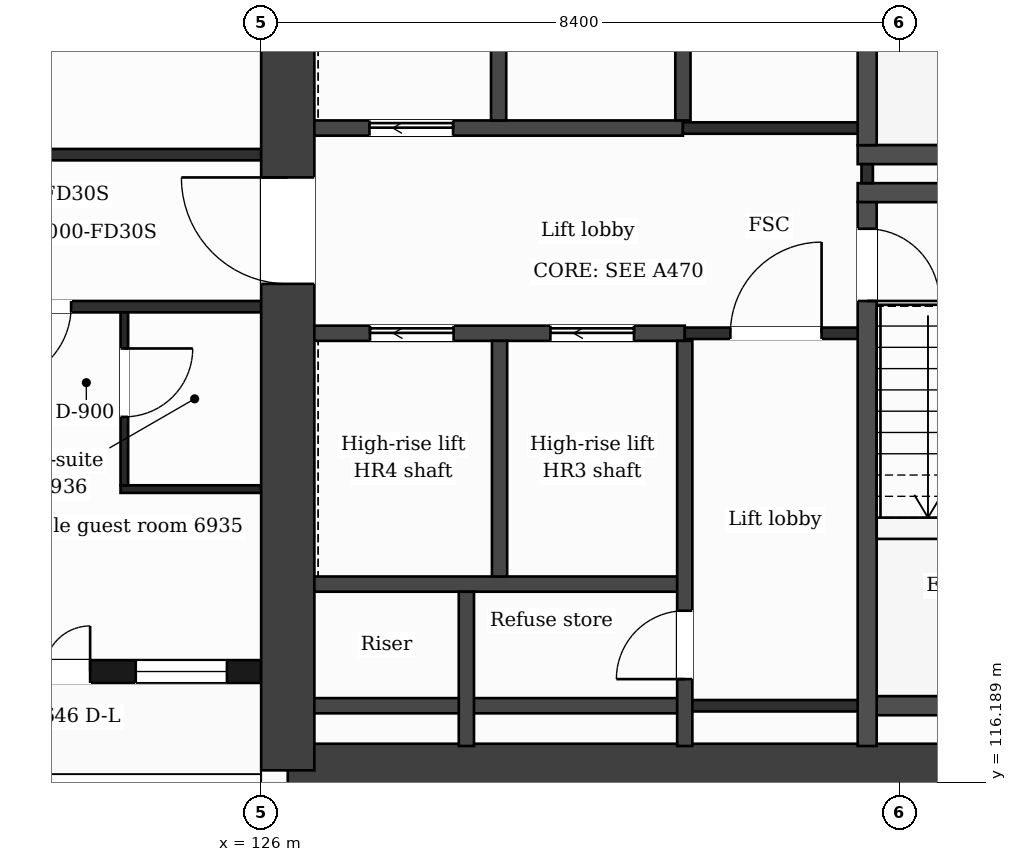
"""IFC4 building model, lengths in metres.
Left out: names, types, materials, properties, quantities, classifications, styles, units other than length and angle.
Written with IfcOpenShell. Run it as: python <this file> out.ifc"""

import sys

from ifc_helpers import new_model, si_unit, direction, frame, frame_2d, origin, place, context, subcontext, project, spatial, rectangle, extrude, element, fill, save


model = new_model("IFC4")
c1 = context("Model", 3, precision=1e-05, world=origin(), true_north=direction((0.0, 1.0)))
c2 = subcontext(c1, "Body", "Model", "MODEL_VIEW")
j1 = project(units=[si_unit("LENGTHUNIT", "METRE"), si_unit("PLANEANGLEUNIT", "RADIAN")], contexts=[c1])
p1 = place(None, origin())
s1 = spatial("IfcSite", under=j1, at=p1, CompositionType="ELEMENT")
p2 = place(p1, origin())
s2 = spatial("IfcBuilding", under=s1, at=p2, CompositionType="ELEMENT")
p3 = place(p2, frame((0.0, 0.0, 284.9)))
s3 = spatial("IfcBuildingStorey", under=s2, at=p3, CompositionType="ELEMENT", Elevation=284.9)
p4 = place(p3, frame((139.977, 116.35, 0.0), z_axis=(0.0, 0.0, 1.0), x_axis=(-1.0, 0.0, 0.0)))
e1 = element("IfcWall", 1, at=p4, inside=s3, PredefinedType="SHEAR", context=c2, shape_type="SweptSolid", body=[
    extrude(rectangle(XDim=13.626, YDim=0.7, at=frame_2d((6.813, 0.0))), origin(), (0.0, 0.0, 1.0), 3.7),
])
p5 = place(p3, frame((126.35, 116.35, 0.0), z_axis=(0.0, 0.0, 1.0), x_axis=(0.0, 1.0, 0.0)))
e2 = element("IfcWall", 2, at=p5, inside=s3, PredefinedType="SHEAR", context=c2, shape_type="SweptSolid", body=[
    extrude(rectangle(XDim=15.7, YDim=0.7, at=frame_2d((7.85, 0.0))), origin(), (0.0, 0.0, 1.0), 3.7),
])
p6 = place(p5, frame((6.4, 0.0, 0.0)))
e3 = element("IfcOpeningElement", 3, at=p6, cuts=e2, PredefinedType="OPENING", context=c2, shape_type="SweptSolid", body=[
    extrude(rectangle(XDim=1.4, YDim=2.1, at=frame_2d((0.7, 1.05))), frame((0.0, 0.36, 0.0), z_axis=(0.0, -1.0, 0.0), x_axis=(1.0, 0.0, 0.0)), (0.0, 0.0, 1.0), 0.72),
])
p7 = place(p3, frame((100.8, 117.65, 0.0), z_axis=(0.0, 0.0, 1.0), x_axis=(1.0, 0.0, 0.0)))
e4 = element("IfcWall", 4, at=p7, inside=s3, PredefinedType="SOLIDWALL", context=c2, shape_type="SweptSolid", body=[
    extrude(rectangle(XDim=25.2, YDim=0.3, at=frame_2d((12.6, 0.0))), origin(), (0.0, 0.0, 1.0), 3.38),
])
p8 = place(p7, frame((0.95, 0.0, 0.9)))
e5 = element("IfcOpeningElement", 5, at=p8, cuts=e4, PredefinedType="OPENING", context=c2, shape_type="SweptSolid", body=[
    extrude(rectangle(XDim=2.4, YDim=2.1, at=frame_2d((1.2, 1.05))), frame((0.0, 0.16, 0.0), z_axis=(0.0, -1.0, 0.0), x_axis=(1.0, 0.0, 0.0)), (0.0, 0.0, 1.0), 0.32),
])
p9 = place(p7, frame((5.1, 0.0, 0.9)))
e6 = element("IfcOpeningElement", 6, at=p9, cuts=e4, PredefinedType="OPENING", context=c2, shape_type="SweptSolid", body=[
    extrude(rectangle(XDim=2.4, YDim=2.1, at=frame_2d((1.2, 1.05))), frame((0.0, 0.16, 0.0), z_axis=(0.0, -1.0, 0.0), x_axis=(1.0, 0.0, 0.0)), (0.0, 0.0, 1.0), 0.32),
])
p10 = place(p7, frame((9.3, 0.0, 0.9)))
e7 = element("IfcOpeningElement", 7, at=p10, cuts=e4, PredefinedType="OPENING", context=c2, shape_type="SweptSolid", body=[
    extrude(rectangle(XDim=2.4, YDim=2.1, at=frame_2d((1.2, 1.05))), frame((0.0, 0.16, 0.0), z_axis=(0.0, -1.0, 0.0), x_axis=(1.0, 0.0, 0.0)), (0.0, 0.0, 1.0), 0.32),
])
p11 = place(p7, frame((14.1, 0.0, 0.9)))
e8 = element("IfcOpeningElement", 8, at=p11, cuts=e4, PredefinedType="OPENING", context=c2, shape_type="SweptSolid", body=[
    extrude(rectangle(XDim=1.2, YDim=2.1, at=frame_2d((0.6, 1.05))), frame((0.0, 0.16, 0.0), z_axis=(0.0, -1.0, 0.0), x_axis=(1.0, 0.0, 0.0)), (0.0, 0.0, 1.0), 0.32),
])
p12 = place(p7, frame((18.3, 0.0, 0.9)))
e9 = element("IfcOpeningElement", 9, at=p12, cuts=e4, PredefinedType="OPENING", context=c2, shape_type="SweptSolid", body=[
    extrude(rectangle(XDim=1.2, YDim=2.1, at=frame_2d((0.6, 1.05))), frame((0.0, 0.16, 0.0), z_axis=(0.0, -1.0, 0.0), x_axis=(1.0, 0.0, 0.0)), (0.0, 0.0, 1.0), 0.32),
])
p13 = place(p7, frame((21.75, 0.0, 0.0)))
e10 = element("IfcOpeningElement", 10, at=p13, cuts=e4, PredefinedType="OPENING", context=c2, shape_type="SweptSolid", body=[
    extrude(rectangle(XDim=1.2, YDim=2.4, at=frame_2d((0.6, 1.2))), frame((0.0, 0.16, 0.0), z_axis=(0.0, -1.0, 0.0), x_axis=(1.0, 0.0, 0.0)), (0.0, 0.0, 1.0), 0.32),
])
p14 = place(p7, frame((23.55, 0.0, 0.9)))
e11 = element("IfcOpeningElement", 11, at=p14, cuts=e4, PredefinedType="OPENING", context=c2, shape_type="SweptSolid", body=[
    extrude(rectangle(XDim=1.2, YDim=2.1, at=frame_2d((0.6, 1.05))), frame((0.0, 0.16, 0.0), z_axis=(0.0, -1.0, 0.0), x_axis=(1.0, 0.0, 0.0)), (0.0, 0.0, 1.0), 0.32),
])
p15 = place(p3, frame((126.7, 117.2, 0.0), z_axis=(0.0, 0.0, 1.0), x_axis=(1.0, 0.0, 0.0)))
e12 = element("IfcWall", 12, at=p15, inside=s3, PredefinedType="PARTITIONING", context=c2, shape_type="SweptSolid", body=[
    extrude(rectangle(XDim=4.873, YDim=0.2, at=frame_2d((2.437, 0.0))), origin(), (0.0, 0.0, 1.0), 3.38),
])
p16 = place(p3, frame((131.573, 117.2, 0.0), z_axis=(0.0, 0.0, 1.0), x_axis=(1.0, 0.0, 0.0)))
e13 = element("IfcWall", 13, at=p16, inside=s3, PredefinedType="PARTITIONING", context=c2, shape_type="SweptSolid", body=[
    extrude(rectangle(XDim=2.4, YDim=0.15, at=frame_2d((1.2, 0.0))), origin(), (0.0, 0.0, 1.0), 3.38),
])
p17 = place(p3, frame((133.973, 117.2, 0.0), z_axis=(0.0, 0.0, 1.0), x_axis=(1.0, 0.0, 0.0)))
e14 = element("IfcWall", 14, at=p17, inside=s3, PredefinedType="PARTITIONING", context=c2, shape_type="SweptSolid", body=[
    extrude(rectangle(XDim=3.275, YDim=0.25, at=frame_2d((1.638, 0.0))), origin(), (0.0, 0.0, 1.0), 3.38),
])
p18 = place(p3, frame((126.7, 118.8, 0.0), z_axis=(0.0, 0.0, 1.0), x_axis=(1.0, 0.0, 0.0)))
e15 = element("IfcWall", 15, at=p18, inside=s3, PredefinedType="PARTITIONING", context=c2, shape_type="SweptSolid", body=[
    extrude(rectangle(XDim=4.873, YDim=0.2, at=frame_2d((2.437, 0.0))), origin(), (0.0, 0.0, 1.0), 3.38),
])
p19 = place(p3, frame((124.15, 120.05, 0.0), z_axis=(0.0, 0.0, 1.0), x_axis=(1.0, 0.0, 0.0)))
e16 = element("IfcWall", 16, at=p19, inside=s3, PredefinedType="PARTITIONING", context=c2, shape_type="SweptSolid", body=[
    extrude(rectangle(XDim=1.85, YDim=0.1, at=frame_2d((0.925, 0.0))), origin(), (0.0, 0.0, 1.0), 3.38),
])
p20 = place(p3, frame((126.7, 122.1, 0.0), z_axis=(0.0, 0.0, 1.0), x_axis=(1.0, 0.0, 0.0)))
e17 = element("IfcWall", 17, at=p20, inside=s3, PredefinedType="PARTITIONING", context=c2, shape_type="SweptSolid", body=[
    extrude(rectangle(XDim=4.873, YDim=0.2, at=frame_2d((2.437, 0.0))), origin(), (0.0, 0.0, 1.0), 3.38),
])
p21 = place(p20, frame((3.105, 0.0, 0.0)))
e18 = element("IfcOpeningElement", 18, at=p21, cuts=e17, PredefinedType="OPENING", context=c2, shape_type="SweptSolid", body=[
    extrude(rectangle(XDim=1.1, YDim=2.1, at=frame_2d((0.55, 1.05))), frame((0.0, 0.11, 0.0), z_axis=(0.0, -1.0, 0.0), x_axis=(1.0, 0.0, 0.0)), (0.0, 0.0, 1.0), 0.22),
])
p22 = place(p20, frame((0.732, 0.0, 0.0)))
e19 = element("IfcOpeningElement", 19, at=p22, cuts=e17, PredefinedType="OPENING", context=c2, shape_type="SweptSolid", body=[
    extrude(rectangle(XDim=1.1, YDim=2.1, at=frame_2d((0.55, 1.05))), frame((0.0, 0.11, 0.0), z_axis=(0.0, -1.0, 0.0), x_axis=(1.0, 0.0, 0.0)), (0.0, 0.0, 1.0), 0.22),
])
p23 = place(p3, frame((131.573, 122.1, 0.0), z_axis=(0.0, 0.0, 1.0), x_axis=(1.0, 0.0, 0.0)))
e20 = element("IfcWall", 20, at=p23, inside=s3, PredefinedType="PARTITIONING", context=c2, shape_type="SweptSolid", body=[
    extrude(rectangle(XDim=2.4, YDim=0.15, at=frame_2d((1.2, 0.0))), origin(), (0.0, 0.0, 1.0), 3.38),
])
p24 = place(p23, frame((0.6, 0.0, 0.0)))
e21 = element("IfcOpeningElement", 21, at=p24, cuts=e20, PredefinedType="OPENING", context=c2, shape_type="SweptSolid", body=[
    extrude(rectangle(XDim=1.2, YDim=2.1, at=frame_2d((0.6, 1.05))), frame((0.0, 0.085, 0.0), z_axis=(0.0, -1.0, 0.0), x_axis=(1.0, 0.0, 0.0)), (0.0, 0.0, 1.0), 0.17),
])
p25 = place(p3, frame((100.8, 122.45, 0.0), z_axis=(0.0, 0.0, 1.0), x_axis=(1.0, 0.0, 0.0)))
e22 = element("IfcWall", 22, at=p25, inside=s3, PredefinedType="PARTITIONING", context=c2, shape_type="SweptSolid", body=[
    extrude(rectangle(XDim=25.2, YDim=0.15, at=frame_2d((12.6, 0.0))), origin(), (0.0, 0.0, 1.0), 3.38),
])
p26 = place(p25, frame((0.55, 0.0, 0.0)))
e23 = element("IfcOpeningElement", 23, at=p26, cuts=e22, PredefinedType="OPENING", context=c2, shape_type="SweptSolid", body=[
    extrude(rectangle(XDim=1.0, YDim=2.1, at=frame_2d((0.5, 1.05))), frame((0.0, 0.085, 0.0), z_axis=(0.0, -1.0, 0.0), x_axis=(1.0, 0.0, 0.0)), (0.0, 0.0, 1.0), 0.17),
])
p27 = place(p25, frame((9.375, 0.0, 0.0)))
e24 = element("IfcOpeningElement", 24, at=p27, cuts=e22, PredefinedType="OPENING", context=c2, shape_type="SweptSolid", body=[
    extrude(rectangle(XDim=1.0, YDim=2.1, at=frame_2d((0.5, 1.05))), frame((0.0, 0.085, 0.0), z_axis=(0.0, -1.0, 0.0), x_axis=(1.0, 0.0, 0.0)), (0.0, 0.0, 1.0), 0.17),
])
p28 = place(p25, frame((13.23, 0.0, 0.0)))
e25 = element("IfcOpeningElement", 25, at=p28, cuts=e22, PredefinedType="OPENING", context=c2, shape_type="SweptSolid", body=[
    extrude(rectangle(XDim=1.0, YDim=2.1, at=frame_2d((0.5, 1.05))), frame((0.0, 0.085, 0.0), z_axis=(0.0, -1.0, 0.0), x_axis=(1.0, 0.0, 0.0)), (0.0, 0.0, 1.0), 0.17),
])
p29 = place(p25, frame((19.513, 0.0, 0.0)))
e26 = element("IfcOpeningElement", 26, at=p29, cuts=e22, PredefinedType="OPENING", context=c2, shape_type="SweptSolid", body=[
    extrude(rectangle(XDim=0.95, YDim=2.1, at=frame_2d((0.475, 1.05))), frame((0.0, 0.085, 0.0), z_axis=(0.0, -1.0, 0.0), x_axis=(1.0, 0.0, 0.0)), (0.0, 0.0, 1.0), 0.17),
])
p30 = place(p25, frame((21.7, 0.0, 0.0)))
e27 = element("IfcOpeningElement", 27, at=p30, cuts=e22, PredefinedType="OPENING", context=c2, shape_type="SweptSolid", body=[
    extrude(rectangle(XDim=1.0, YDim=2.1, at=frame_2d((0.5, 1.05))), frame((0.0, 0.085, 0.0), z_axis=(0.0, -1.0, 0.0), x_axis=(1.0, 0.0, 0.0)), (0.0, 0.0, 1.0), 0.17),
])
for number, where, z_axis, x_axis in (
    (28, (133.848, 123.95, 0.0), (0.0, 0.0, 1.0), (1.0, 0.0, 0.0)),
    (29, (133.848, 124.45, 0.0), (0.0, 0.0, 1.0), (1.0, 0.0, 0.0)),
):
    element("IfcWall", number, at=place(p3, frame(where, z_axis=z_axis, x_axis=x_axis)), inside=s3, PredefinedType="PARTITIONING", context=c2, shape_type="SweptSolid", body=[
        extrude(rectangle(XDim=3.4, YDim=0.25, at=frame_2d((1.7, 0.0))), origin(), (0.0, 0.0, 1.0), 3.38),
    ])
p31 = place(p3, frame((100.8, 124.45, 0.0), z_axis=(0.0, 0.0, 1.0), x_axis=(1.0, 0.0, 0.0)))
e30 = element("IfcWall", 30, at=p31, inside=s3, PredefinedType="PARTITIONING", context=c2, shape_type="SweptSolid", body=[
    extrude(rectangle(XDim=25.2, YDim=0.15, at=frame_2d((12.6, 0.0))), origin(), (0.0, 0.0, 1.0), 3.38),
])
p32 = place(p31, frame((21.075, 0.0, 0.0)))
e31 = element("IfcOpeningElement", 31, at=p32, cuts=e30, PredefinedType="OPENING", context=c2, shape_type="SweptSolid", body=[
    extrude(rectangle(XDim=1.0, YDim=2.1, at=frame_2d((0.5, 1.05))), frame((0.0, 0.085, 0.0), z_axis=(0.0, -1.0, 0.0), x_axis=(1.0, 0.0, 0.0)), (0.0, 0.0, 1.0), 0.17),
])
p33 = place(p31, frame((5.375, 0.0, 0.0)))
e32 = element("IfcOpeningElement", 32, at=p33, cuts=e30, PredefinedType="OPENING", context=c2, shape_type="SweptSolid", body=[
    extrude(rectangle(XDim=1.0, YDim=2.1, at=frame_2d((0.5, 1.05))), frame((0.0, 0.085, 0.0), z_axis=(0.0, -1.0, 0.0), x_axis=(1.0, 0.0, 0.0)), (0.0, 0.0, 1.0), 0.17),
])
p34 = place(p31, frame((12.1, 0.0, 0.0)))
e33 = element("IfcOpeningElement", 33, at=p34, cuts=e30, PredefinedType="OPENING", context=c2, shape_type="SweptSolid", body=[
    extrude(rectangle(XDim=1.0, YDim=2.1, at=frame_2d((0.5, 1.05))), frame((0.0, 0.085, 0.0), z_axis=(0.0, -1.0, 0.0), x_axis=(1.0, 0.0, 0.0)), (0.0, 0.0, 1.0), 0.17),
])
p35 = place(p31, frame((17.93, 0.0, 0.0)))
e34 = element("IfcOpeningElement", 34, at=p35, cuts=e30, PredefinedType="OPENING", context=c2, shape_type="SweptSolid", body=[
    extrude(rectangle(XDim=1.0, YDim=2.1, at=frame_2d((0.5, 1.05))), frame((0.0, 0.085, 0.0), z_axis=(0.0, -1.0, 0.0), x_axis=(1.0, 0.0, 0.0)), (0.0, 0.0, 1.0), 0.17),
])
p36 = place(p3, frame((126.7, 124.8, 0.0), z_axis=(0.0, 0.0, 1.0), x_axis=(1.0, 0.0, 0.0)))
e35 = element("IfcWall", 35, at=p36, inside=s3, PredefinedType="PARTITIONING", context=c2, shape_type="SweptSolid", body=[
    extrude(rectangle(XDim=4.849, YDim=0.2, at=frame_2d((2.424, 0.0))), origin(), (0.0, 0.0, 1.0), 3.38),
])
p37 = place(p36, frame((0.725, 0.0, 0.0)))
e36 = element("IfcOpeningElement", 36, at=p37, cuts=e35, PredefinedType="OPENING", context=c2, shape_type="SweptSolid", body=[
    extrude(rectangle(XDim=1.1, YDim=2.1, at=frame_2d((0.55, 1.05))), frame((0.0, 0.11, 0.0), z_axis=(0.0, -1.0, 0.0), x_axis=(1.0, 0.0, 0.0)), (0.0, 0.0, 1.0), 0.22),
])
p38 = place(p3, frame((131.549, 124.8, 0.0), z_axis=(0.0, 0.0, 1.0), x_axis=(1.0, 0.0, 0.0)))
e37 = element("IfcWall", 37, at=p38, inside=s3, PredefinedType="PARTITIONING", context=c2, shape_type="SweptSolid", body=[
    extrude(rectangle(XDim=2.549, YDim=0.15, at=frame_2d((1.275, 0.0))), origin(), (0.0, 0.0, 1.0), 3.38),
])
p39 = place(p3, frame((124.2, 120.1, 0.0), z_axis=(0.0, 0.0, 1.0), x_axis=(0.0, 1.0, 0.0)))
e38 = element("IfcWall", 38, at=p39, inside=s3, PredefinedType="PARTITIONING", context=c2, shape_type="SweptSolid", body=[
    extrude(rectangle(XDim=2.275, YDim=0.1, at=frame_2d((1.137, 0.0))), origin(), (0.0, 0.0, 1.0), 3.38),
])
p40 = place(p39, frame((0.9, 0.0, 0.0)))
e39 = element("IfcOpeningElement", 39, at=p40, cuts=e38, PredefinedType="OPENING", context=c2, shape_type="SweptSolid", body=[
    extrude(rectangle(XDim=0.9, YDim=2.1, at=frame_2d((0.45, 1.05))), frame((0.0, 0.06, 0.0), z_axis=(0.0, -1.0, 0.0), x_axis=(1.0, 0.0, 0.0)), (0.0, 0.0, 1.0), 0.12),
])
p41 = place(p3, frame((128.7, 116.67, 0.0), z_axis=(0.0, 0.0, 1.0), x_axis=(0.0, 1.0, 0.0)))
e40 = element("IfcWall", 40, at=p41, inside=s3, PredefinedType="PARTITIONING", context=c2, shape_type="SweptSolid", body=[
    extrude(rectangle(XDim=2.03, YDim=0.2, at=frame_2d((1.015, 0.0))), origin(), (0.0, 0.0, 1.0), 3.38),
])
for number, where, z_axis, x_axis in (
    (41, (129.124, 124.9, 0.0), (0.0, 0.0, 1.0), (0.0, 1.0, 0.0)),
    (42, (129.136, 118.9, 0.0), (0.0, 0.0, 1.0), (0.0, 1.0, 0.0)),
    (43, (131.549, 124.9, 0.0), (0.0, 0.0, 1.0), (0.0, 1.0, 0.0)),
):
    element("IfcWall", number, at=place(p3, frame(where, z_axis=z_axis, x_axis=x_axis)), inside=s3, PredefinedType="PARTITIONING", context=c2, shape_type="SweptSolid", body=[
        extrude(rectangle(XDim=3.1, YDim=0.2, at=frame_2d((1.55, 0.0))), origin(), (0.0, 0.0, 1.0), 3.38),
    ])
p42 = place(p3, frame((131.573, 116.67, 0.0), z_axis=(0.0, 0.0, 1.0), x_axis=(0.0, 1.0, 0.0)))
e44 = element("IfcWall", 44, at=p42, inside=s3, PredefinedType="PARTITIONING", context=c2, shape_type="SweptSolid", body=[
    extrude(rectangle(XDim=5.33, YDim=0.2, at=frame_2d((2.665, 0.0))), origin(), (0.0, 0.0, 1.0), 3.38),
])
p43 = place(p42, frame((0.88, 0.0, 0.0)))
e45 = element("IfcOpeningElement", 45, at=p43, cuts=e44, PredefinedType="OPENING", context=c2, shape_type="SweptSolid", body=[
    extrude(rectangle(XDim=0.9, YDim=2.1, at=frame_2d((0.45, 1.05))), frame((0.0, 0.11, 0.0), z_axis=(0.0, -1.0, 0.0), x_axis=(1.0, 0.0, 0.0)), (0.0, 0.0, 1.0), 0.22),
])
p44 = place(p3, frame((133.973, 124.075, 0.0), z_axis=(0.0, 0.0, 1.0), x_axis=(0.0, 1.0, 0.0)))
e46 = element("IfcWall", 46, at=p44, inside=s3, PredefinedType="PARTITIONING", context=c2, shape_type="SweptSolid", body=[
    extrude(rectangle(XDim=0.25, YDim=0.15, at=frame_2d((0.125, 0.0))), origin(), (0.0, 0.0, 1.0), 3.38),
])
p45 = place(p3, frame((133.973, 116.67, 0.0), z_axis=(0.0, 0.0, 1.0), x_axis=(0.0, 1.0, 0.0)))
e47 = element("IfcWall", 47, at=p45, inside=s3, PredefinedType="PARTITIONING", context=c2, shape_type="SweptSolid", body=[
    extrude(rectangle(XDim=7.155, YDim=0.25, at=frame_2d((3.578, 0.0))), origin(), (0.0, 0.0, 1.0), 3.38),
])
p46 = place(p45, frame((5.855, 0.0, 0.0)))
e48 = element("IfcOpeningElement", 48, at=p46, cuts=e47, PredefinedType="OPENING", context=c2, shape_type="SweptSolid", body=[
    extrude(rectangle(XDim=0.95, YDim=2.1, at=frame_2d((0.475, 1.05))), frame((0.0, 0.135, 0.0), z_axis=(0.0, -1.0, 0.0), x_axis=(1.0, 0.0, 0.0)), (0.0, 0.0, 1.0), 0.27),
])
p47 = place(p3, frame((133.973, 124.575, 0.0), z_axis=(0.0, 0.0, 1.0), x_axis=(0.0, 1.0, 0.0)))
e49 = element("IfcWall", 49, at=p47, inside=s3, PredefinedType="PARTITIONING", context=c2, shape_type="SweptSolid", body=[
    extrude(rectangle(XDim=7.155, YDim=0.25, at=frame_2d((3.578, 0.0))), origin(), (0.0, 0.0, 1.0), 3.38),
])
p48 = place(p47, frame((5.325, 0.0, 0.0)))
e50 = element("IfcOpeningElement", 50, at=p48, cuts=e49, PredefinedType="OPENING", context=c2, shape_type="SweptSolid", body=[
    extrude(rectangle(XDim=1.0, YDim=2.1, at=frame_2d((0.5, 1.05))), frame((0.0, 0.135, 0.0), z_axis=(0.0, -1.0, 0.0), x_axis=(1.0, 0.0, 0.0)), (0.0, 0.0, 1.0), 0.27),
])
p49 = place(p13, origin())
e51 = element("IfcDoor", 51, at=p49, inside=s3, OperationType="DOUBLE_DOOR_SINGLE_SWING", PredefinedType="DOOR", context=c2, shape_type="SweptSolid", body=[
    extrude(rectangle(XDim=1.2, YDim=2.4, at=frame_2d((0.6, 1.2))), frame((0.0, 0.025, 0.0), z_axis=(0.0, -1.0, 0.0), x_axis=(1.0, 0.0, 0.0)), (0.0, 0.0, 1.0), 0.05),
])
fill(e10, e51)
p50 = place(p14, origin())
e52 = element("IfcWindow", 52, at=p50, inside=s3, PartitioningType="SINGLE_PANEL", PredefinedType="WINDOW", context=c2, shape_type="SweptSolid", body=[
    extrude(rectangle(XDim=1.2, YDim=2.1, at=frame_2d((0.6, 1.05))), frame((0.0, 0.03, 0.0), z_axis=(0.0, -1.0, 0.0), x_axis=(1.0, 0.0, 0.0)), (0.0, 0.0, 1.0), 0.06),
])
fill(e11, e52)
p51 = place(p24, origin())
e53 = element("IfcDoor", 53, at=p51, inside=s3, OperationType="SINGLE_SWING_RIGHT", PredefinedType="DOOR", context=c2, shape_type="SweptSolid", body=[
    extrude(rectangle(XDim=1.2, YDim=2.1, at=frame_2d((0.6, 1.05))), frame((0.0, 0.025, 0.0), z_axis=(0.0, -1.0, 0.0), x_axis=(1.0, 0.0, 0.0)), (0.0, 0.0, 1.0), 0.05),
])
fill(e21, e53)
p52 = place(p21, origin())
e54 = element("IfcDoor", 54, at=p52, inside=s3, OperationType="SLIDING_TO_LEFT", PredefinedType="DOOR", context=c2, shape_type="SweptSolid", body=[
    extrude(rectangle(XDim=1.1, YDim=2.1, at=frame_2d((0.55, 1.05))), frame((0.0, 0.025, 0.0), z_axis=(0.0, -1.0, 0.0), x_axis=(1.0, 0.0, 0.0)), (0.0, 0.0, 1.0), 0.05),
])
fill(e18, e54)
p53 = place(p22, origin())
e55 = element("IfcDoor", 55, at=p53, inside=s3, OperationType="SLIDING_TO_LEFT", PredefinedType="DOOR", context=c2, shape_type="SweptSolid", body=[
    extrude(rectangle(XDim=1.1, YDim=2.1, at=frame_2d((0.55, 1.05))), frame((0.0, 0.025, 0.0), z_axis=(0.0, -1.0, 0.0), x_axis=(1.0, 0.0, 0.0)), (0.0, 0.0, 1.0), 0.05),
])
fill(e19, e55)
p54 = place(p37, origin())
e56 = element("IfcDoor", 56, at=p54, inside=s3, OperationType="SLIDING_TO_LEFT", PredefinedType="DOOR", context=c2, shape_type="SweptSolid", body=[
    extrude(rectangle(XDim=1.1, YDim=2.1, at=frame_2d((0.55, 1.05))), frame((0.0, 0.025, 0.0), z_axis=(0.0, -1.0, 0.0), x_axis=(1.0, 0.0, 0.0)), (0.0, 0.0, 1.0), 0.05),
])
fill(e36, e56)
p55 = place(p46, origin())
e57 = element("IfcDoor", 57, at=p55, inside=s3, OperationType="SINGLE_SWING_LEFT", PredefinedType="DOOR", context=c2, shape_type="SweptSolid", body=[
    extrude(rectangle(XDim=0.95, YDim=2.1, at=frame_2d((0.475, 1.05))), frame((0.0, 0.025, 0.0), z_axis=(0.0, -1.0, 0.0), x_axis=(1.0, 0.0, 0.0)), (0.0, 0.0, 1.0), 0.05),
])
fill(e48, e57)
p56 = place(p43, origin())
e58 = element("IfcDoor", 58, at=p56, inside=s3, OperationType="SINGLE_SWING_LEFT", PredefinedType="DOOR", context=c2, shape_type="SweptSolid", body=[
    extrude(rectangle(XDim=0.9, YDim=2.1, at=frame_2d((0.45, 1.05))), frame((0.0, 0.025, 0.0), z_axis=(0.0, -1.0, 0.0), x_axis=(1.0, 0.0, 0.0)), (0.0, 0.0, 1.0), 0.05),
])
fill(e45, e58)
p57 = place(p30, origin())
e59 = element("IfcDoor", 59, at=p57, inside=s3, OperationType="SINGLE_SWING_LEFT", PredefinedType="DOOR", context=c2, shape_type="SweptSolid", body=[
    extrude(rectangle(XDim=1.0, YDim=2.1, at=frame_2d((0.5, 1.05))), frame((0.0, 0.025, 0.0), z_axis=(0.0, -1.0, 0.0), x_axis=(1.0, 0.0, 0.0)), (0.0, 0.0, 1.0), 0.05),
])
fill(e27, e59)
p58 = place(p40, origin())
e60 = element("IfcDoor", 60, at=p58, inside=s3, OperationType="SINGLE_SWING_RIGHT", PredefinedType="DOOR", context=c2, shape_type="SweptSolid", body=[
    extrude(rectangle(XDim=0.9, YDim=2.1, at=frame_2d((0.45, 1.05))), frame((0.0, 0.025, 0.0), z_axis=(0.0, -1.0, 0.0), x_axis=(1.0, 0.0, 0.0)), (0.0, 0.0, 1.0), 0.05),
])
fill(e39, e60)
p59 = place(p6, origin())
e61 = element("IfcDoor", 61, at=p59, inside=s3, OperationType="SINGLE_SWING_RIGHT", PredefinedType="DOOR", context=c2, shape_type="SweptSolid", body=[
    extrude(rectangle(XDim=1.4, YDim=2.1, at=frame_2d((0.7, 1.05))), frame((0.0, 0.025, 0.0), z_axis=(0.0, -1.0, 0.0), x_axis=(1.0, 0.0, 0.0)), (0.0, 0.0, 1.0), 0.05),
])
fill(e3, e61)
save(model, sys.argv[1])
